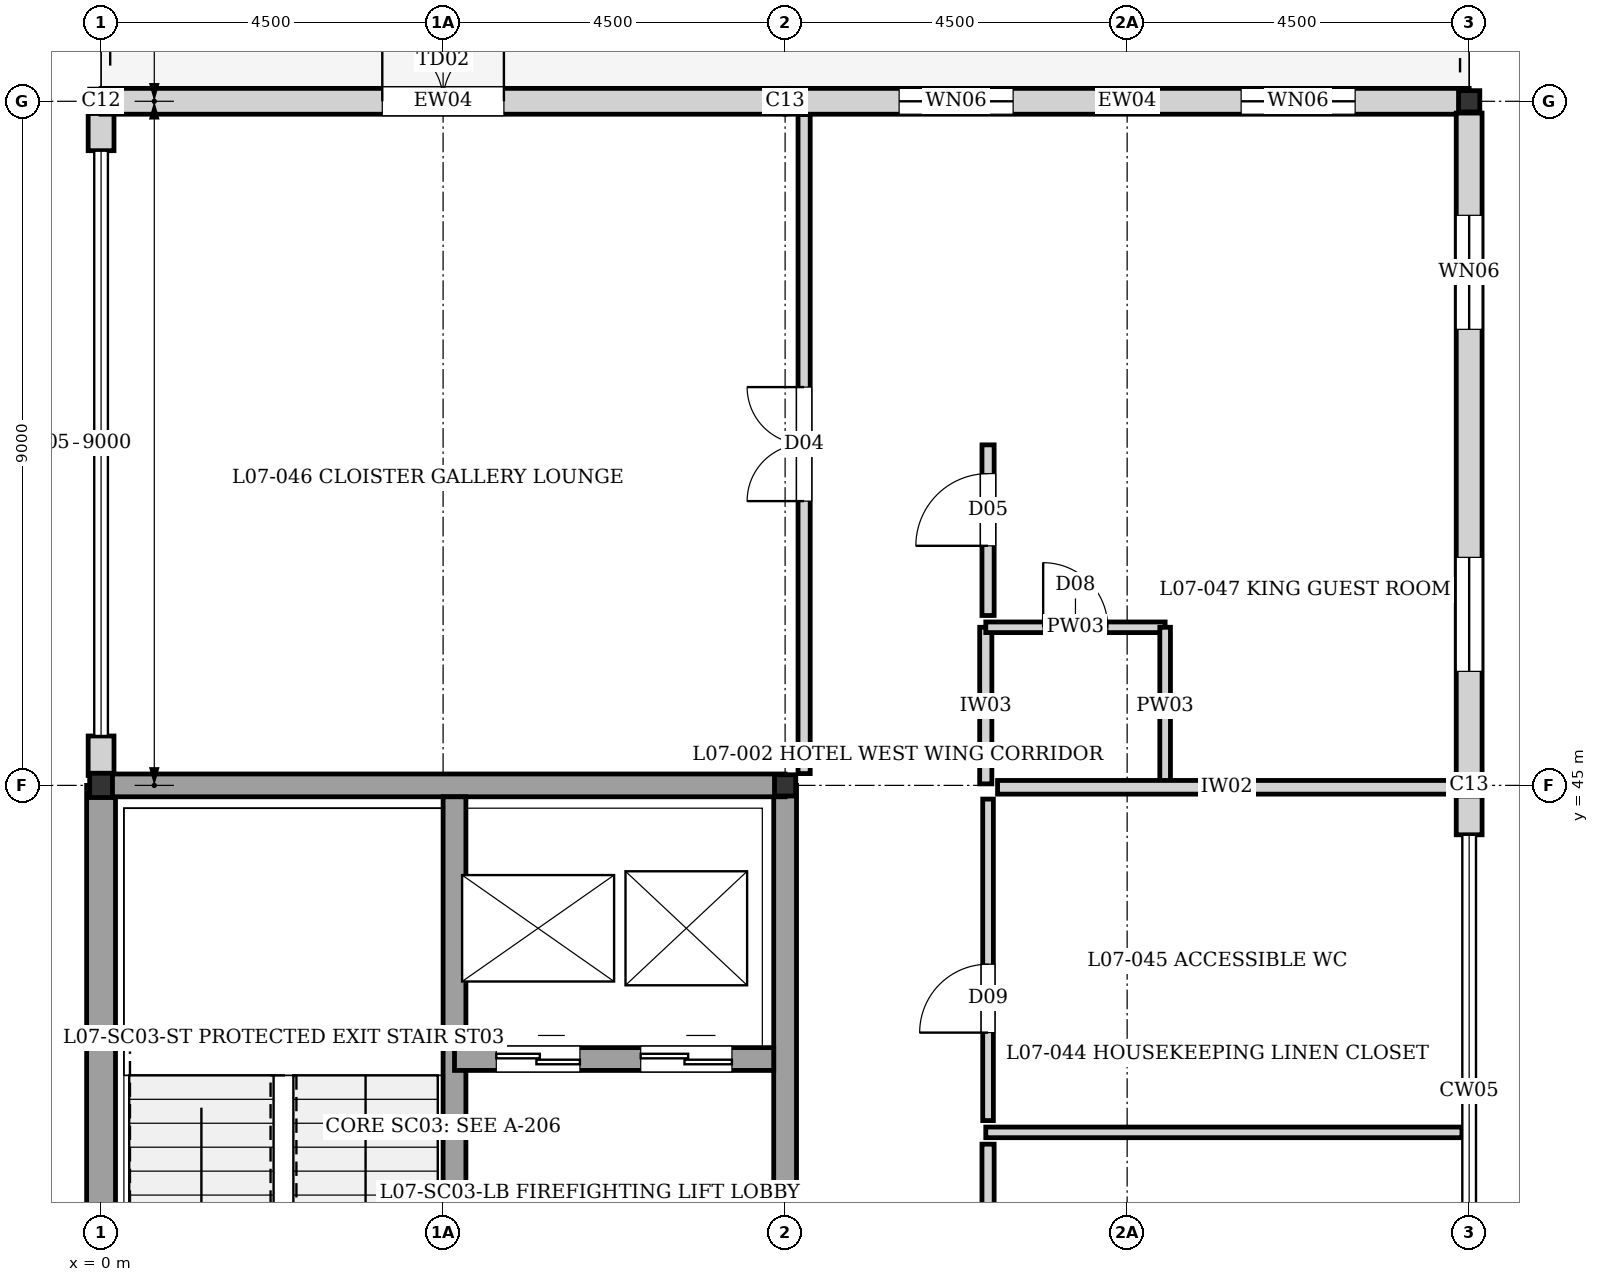
"""IFC4 building model, lengths in metres.
Left out: names, types, materials, properties, quantities, classifications, styles, units other than length and angle.
Written with IfcOpenShell. Run it as: python <this file> out.ifc"""

import sys

from ifc_helpers import new_model, si_unit, direction, frame, frame_2d, origin, origin_2d, place, context, subcontext, project, spatial, rectangle, i_section, extrude, element, fill, save


model = new_model("IFC4")
c1 = context("Model", 3, precision=1e-05, world=origin(), true_north=direction((0.0, 1.0)))
c2 = subcontext(c1, "Body", "Model", "MODEL_VIEW")
j1 = project(units=[si_unit("LENGTHUNIT", "METRE"), si_unit("PLANEANGLEUNIT", "RADIAN")], contexts=[c1])
p1 = place(None, origin())
s1 = spatial("IfcSite", under=j1, at=p1, CompositionType="ELEMENT")
p2 = place(p1, origin())
s2 = spatial("IfcBuilding", under=s1, at=p2, CompositionType="ELEMENT")
p3 = place(p2, frame((0.0, 0.0, 23.68)))
s3 = spatial("IfcBuildingStorey", under=s2, at=p3, CompositionType="ELEMENT", Elevation=23.68)
for number, where, z_axis, x_axis in (
    (1, (0.0, 45.0, 0.0), (0.0, 0.0, 1.0), (1.0, 0.0, 0.0)),
    (2, (0.0, 54.0, 0.0), (0.0, 0.0, 1.0), (1.0, 0.0, 0.0)),
):
    element("IfcColumn", number, at=place(p3, frame(where, z_axis=z_axis, x_axis=x_axis)), inside=s3, PredefinedType="COLUMN", context=c2, shape_type="SweptSolid", body=[
        extrude(i_section(OverallWidth=0.3, OverallDepth=0.32, WebThickness=0.011, FlangeThickness=0.021, at=origin_2d()), origin(), (0.0, 0.0, 1.0), 3.2),
    ])
for number, where, z_axis, x_axis in (
    (3, (9.0, 45.0, 0.0), (0.0, 0.0, 1.0), (1.0, 0.0, 0.0)),
    (4, (9.0, 54.0, 0.0), (0.0, 0.0, 1.0), (1.0, 0.0, 0.0)),
    (5, (18.0, 45.0, 0.0), (0.0, 0.0, 1.0), (1.0, 0.0, 0.0)),
    (6, (18.0, 54.0, 0.0), (0.0, 0.0, 1.0), (1.0, 0.0, 0.0)),
):
    element("IfcColumn", number, at=place(p3, frame(where, z_axis=z_axis, x_axis=x_axis)), inside=s3, PredefinedType="COLUMN", context=c2, shape_type="SweptSolid", body=[
        extrude(i_section(OverallWidth=0.28, OverallDepth=0.28, WebThickness=0.01, FlangeThickness=0.018, at=origin_2d()), origin(), (0.0, 0.0, 1.0), 3.2),
    ])
p4 = place(p3, frame((0.0, 36.0, 0.0), z_axis=(0.0, 0.0, 1.0), x_axis=(0.0, 1.0, 0.0)))
e7 = element("IfcWall", 7, at=p4, inside=s3, PredefinedType="SOLIDWALL", context=c2, shape_type="SweptSolid", body=[
    extrude(rectangle(XDim=9.0, YDim=0.38, at=frame_2d((4.5, 0.0))), origin(), (0.0, 0.0, 1.0), 2.96),
])
p5 = place(p3, frame((0.0, 45.13, 0.0), z_axis=(0.0, 0.0, 1.0), x_axis=(0.0, 1.0, 0.0)))
e8 = element("IfcWall", 8, at=p5, inside=s3, PredefinedType="SOLIDWALL", context=c2, shape_type="SweptSolid", body=[
    extrude(rectangle(XDim=0.52, YDim=0.34, at=frame_2d((0.26, 0.0))), origin(), (0.0, 0.0, 1.0), 2.56),
])
p6 = place(p3, frame((0.0, 53.35, 0.0), z_axis=(0.0, 0.0, 1.0), x_axis=(0.0, 1.0, 0.0)))
e9 = element("IfcWall", 9, at=p6, inside=s3, PredefinedType="SOLIDWALL", context=c2, shape_type="SweptSolid", body=[
    extrude(rectangle(XDim=0.495, YDim=0.34, at=frame_2d((0.248, 0.0))), origin(), (0.0, 0.0, 1.0), 2.96),
])
p7 = place(p3, frame((0.0, 54.0, 0.0), z_axis=(0.0, 0.0, 1.0), x_axis=(1.0, 0.0, 0.0)))
e10 = element("IfcWall", 10, at=p7, inside=s3, PredefinedType="SOLIDWALL", context=c2, shape_type="SweptSolid", body=[
    extrude(rectangle(XDim=9.0, YDim=0.34, at=frame_2d((4.5, 0.0))), origin(), (0.0, 0.0, 1.0), 2.46),
])
p8 = place(p7, frame((3.7, 0.0, 0.0)))
e11 = element("IfcOpeningElement", 11, at=p8, cuts=e10, PredefinedType="OPENING", context=c2, shape_type="SweptSolid", body=[
    extrude(rectangle(XDim=1.6, YDim=2.25, at=frame_2d((0.8, 1.125))), frame((0.0, 0.18, 0.0), z_axis=(0.0, -1.0, 0.0), x_axis=(1.0, 0.0, 0.0)), (0.0, 0.0, 1.0), 0.36),
])
p9 = place(p3, frame((9.0, 54.0, 0.0), z_axis=(0.0, 0.0, 1.0), x_axis=(1.0, 0.0, 0.0)))
e12 = element("IfcWall", 12, at=p9, inside=s3, PredefinedType="SOLIDWALL", context=c2, shape_type="SweptSolid", body=[
    extrude(rectangle(XDim=9.0, YDim=0.34, at=frame_2d((4.5, 0.0))), origin(), (0.0, 0.0, 1.0), 2.41),
])
p10 = place(p9, frame((1.5, 0.0, 0.35)))
e13 = element("IfcOpeningElement", 13, at=p10, cuts=e12, PredefinedType="OPENING", context=c2, shape_type="SweptSolid", body=[
    extrude(rectangle(XDim=1.5, YDim=1.8, at=frame_2d((0.75, 0.9))), frame((0.0, 0.18, 0.0), z_axis=(0.0, -1.0, 0.0), x_axis=(1.0, 0.0, 0.0)), (0.0, 0.0, 1.0), 0.36),
])
p11 = place(p9, frame((6.0, 0.0, 0.35)))
e14 = element("IfcOpeningElement", 14, at=p11, cuts=e12, PredefinedType="OPENING", context=c2, shape_type="SweptSolid", body=[
    extrude(rectangle(XDim=1.5, YDim=1.8, at=frame_2d((0.75, 0.9))), frame((0.0, 0.18, 0.0), z_axis=(0.0, -1.0, 0.0), x_axis=(1.0, 0.0, 0.0)), (0.0, 0.0, 1.0), 0.36),
])
p12 = place(p3, frame((18.0, 53.845, 0.0), z_axis=(0.0, 0.0, 1.0), x_axis=(0.0, -1.0, 0.0)))
e15 = element("IfcWall", 15, at=p12, inside=s3, PredefinedType="SOLIDWALL", context=c2, shape_type="SweptSolid", body=[
    extrude(rectangle(XDim=8.845, YDim=0.34, at=frame_2d((4.422, 0.0))), origin(), (0.0, 0.0, 1.0), 2.56),
])
p13 = place(p12, frame((1.345, 0.0, 0.35)))
e16 = element("IfcOpeningElement", 16, at=p13, cuts=e15, PredefinedType="OPENING", context=c2, shape_type="SweptSolid", body=[
    extrude(rectangle(XDim=1.5, YDim=1.8, at=frame_2d((0.75, 0.9))), frame((0.0, 0.18, 0.0), z_axis=(0.0, -1.0, 0.0), x_axis=(1.0, 0.0, 0.0)), (0.0, 0.0, 1.0), 0.36),
])
p14 = place(p12, frame((5.845, 0.0, 0.35)))
e17 = element("IfcOpeningElement", 17, at=p14, cuts=e15, PredefinedType="OPENING", context=c2, shape_type="SweptSolid", body=[
    extrude(rectangle(XDim=1.5, YDim=1.8, at=frame_2d((0.75, 0.9))), frame((0.0, 0.18, 0.0), z_axis=(0.0, -1.0, 0.0), x_axis=(1.0, 0.0, 0.0)), (0.0, 0.0, 1.0), 0.36),
])
p15 = place(p3, frame((18.0, 45.0, 0.0), z_axis=(0.0, 0.0, 1.0), x_axis=(0.0, -1.0, 0.0)))
e18 = element("IfcWall", 18, at=p15, inside=s3, PredefinedType="SOLIDWALL", context=c2, shape_type="SweptSolid", body=[
    extrude(rectangle(XDim=0.65, YDim=0.34, at=frame_2d((0.325, 0.0))), origin(), (0.0, 0.0, 1.0), 2.6),
])
p16 = place(p3, frame((9.0, 36.0, 0.0), z_axis=(0.0, 0.0, 1.0), x_axis=(0.0, 1.0, 0.0)))
e19 = element("IfcWall", 19, at=p16, inside=s3, PredefinedType="SHEAR", context=c2, shape_type="SweptSolid", body=[
    extrude(rectangle(XDim=9.0, YDim=0.3, at=frame_2d((4.5, 0.0))), origin(), (0.0, 0.0, 1.0), 2.96),
])
p17 = place(p16, frame((1.95, 0.0, 0.0)))
e20 = element("IfcOpeningElement", 20, at=p17, cuts=e19, PredefinedType="OPENING", context=c2, shape_type="SweptSolid", body=[
    extrude(rectangle(XDim=1.6, YDim=2.1, at=frame_2d((0.8, 1.05))), frame((0.0, 0.16, 0.0), z_axis=(0.0, -1.0, 0.0), x_axis=(1.0, 0.0, 0.0)), (0.0, 0.0, 1.0), 0.32),
])
p18 = place(p3, frame((0.0, 45.0, 0.0), z_axis=(0.0, 0.0, 1.0), x_axis=(1.0, 0.0, 0.0)))
e21 = element("IfcWall", 21, at=p18, inside=s3, PredefinedType="SHEAR", context=c2, shape_type="SweptSolid", body=[
    extrude(rectangle(XDim=9.0, YDim=0.3, at=frame_2d((4.5, 0.0))), origin(), (0.0, 0.0, 1.0), 2.96),
])
p19 = place(p3, frame((4.65, 36.15, 0.0), z_axis=(0.0, 0.0, 1.0), x_axis=(0.0, 1.0, 0.0)))
e22 = element("IfcWall", 22, at=p19, inside=s3, PredefinedType="SHEAR", context=c2, shape_type="SweptSolid", body=[
    extrude(rectangle(XDim=8.7, YDim=0.3, at=frame_2d((4.35, 0.0))), origin(), (0.0, 0.0, 1.0), 2.96),
])
p20 = place(p19, frame((0.35, 0.0, 0.0)))
e23 = element("IfcOpeningElement", 23, at=p20, cuts=e22, PredefinedType="OPENING", context=c2, shape_type="SweptSolid", body=[
    extrude(rectangle(XDim=1.4, YDim=2.02, at=frame_2d((0.7, 1.01))), frame((0.0, 0.16, 0.0), z_axis=(0.0, -1.0, 0.0), x_axis=(1.0, 0.0, 0.0)), (0.0, 0.0, 1.0), 0.32),
])
p21 = place(p3, frame((4.65, 41.4, 0.0), z_axis=(0.0, 0.0, 1.0), x_axis=(1.0, 0.0, 0.0)))
e24 = element("IfcWall", 24, at=p21, inside=s3, PredefinedType="SHEAR", context=c2, shape_type="SweptSolid", body=[
    extrude(rectangle(XDim=4.2, YDim=0.3, at=frame_2d((2.1, 0.0))), origin(), (0.0, 0.0, 1.0), 2.96),
])
p22 = place(p21, frame((0.55, 0.0, 0.0)))
e25 = element("IfcOpeningElement", 25, at=p22, cuts=e24, PredefinedType="OPENING", context=c2, shape_type="SweptSolid", body=[
    extrude(rectangle(XDim=1.1, YDim=2.1, at=frame_2d((0.55, 1.05))), frame((0.0, 0.16, 0.0), z_axis=(0.0, -1.0, 0.0), x_axis=(1.0, 0.0, 0.0)), (0.0, 0.0, 1.0), 0.32),
])
p23 = place(p21, frame((2.45, 0.0, 0.0)))
e26 = element("IfcOpeningElement", 26, at=p23, cuts=e24, PredefinedType="OPENING", context=c2, shape_type="SweptSolid", body=[
    extrude(rectangle(XDim=1.2, YDim=2.2, at=frame_2d((0.6, 1.1))), frame((0.0, 0.16, 0.0), z_axis=(0.0, -1.0, 0.0), x_axis=(1.0, 0.0, 0.0)), (0.0, 0.0, 1.0), 0.32),
])
p24 = place(p3, frame((11.64, 45.02, 0.0), z_axis=(0.0, 0.0, 1.0), x_axis=(0.0, 1.0, 0.0)))
e27 = element("IfcWall", 27, at=p24, inside=s3, PredefinedType="PARTITIONING", context=c2, shape_type="SweptSolid", body=[
    extrude(rectangle(XDim=2.06, YDim=0.16, at=frame_2d((1.03, 0.0))), origin(), (0.0, 0.0, 1.0), 2.96),
])
p25 = place(p3, frame((11.64, 47.08, 0.0), z_axis=(0.0, 0.0, 1.0), x_axis=(1.0, 0.0, 0.0)))
e28 = element("IfcWall", 28, at=p25, inside=s3, PredefinedType="PLUMBINGWALL", context=c2, shape_type="SweptSolid", body=[
    extrude(rectangle(XDim=2.36, YDim=0.14, at=frame_2d((1.18, 0.0))), origin(), (0.0, 0.0, 1.0), 2.96),
])
p26 = place(p25, frame((0.755, 0.0, 0.0)))
e29 = element("IfcOpeningElement", 29, at=p26, cuts=e28, PredefinedType="OPENING", context=c2, shape_type="SweptSolid", body=[
    extrude(rectangle(XDim=0.85, YDim=2.04, at=frame_2d((0.425, 1.02))), frame((0.0, 0.08, 0.0), z_axis=(0.0, -1.0, 0.0), x_axis=(1.0, 0.0, 0.0)), (0.0, 0.0, 1.0), 0.16),
])
p27 = place(p3, frame((14.0, 45.02, 0.0), z_axis=(0.0, 0.0, 1.0), x_axis=(0.0, 1.0, 0.0)))
e30 = element("IfcWall", 30, at=p27, inside=s3, PredefinedType="PLUMBINGWALL", context=c2, shape_type="SweptSolid", body=[
    extrude(rectangle(XDim=2.06, YDim=0.14, at=frame_2d((1.03, 0.0))), origin(), (0.0, 0.0, 1.0), 2.96),
])
p28 = place(p3, frame((11.795, 44.975, 0.0), z_axis=(0.0, 0.0, 1.0), x_axis=(1.0, 0.0, 0.0)))
e31 = element("IfcWall", 31, at=p28, inside=s3, PredefinedType="PARTITIONING", context=c2, shape_type="SweptSolid", body=[
    extrude(rectangle(XDim=6.03, YDim=0.18, at=frame_2d((3.015, 0.0))), origin(), (0.0, 0.0, 1.0), 2.6),
])
p29 = place(p3, frame((11.64, 40.435, 0.0), z_axis=(0.0, 0.0, 1.0), x_axis=(1.0, 0.0, 0.0)))
e32 = element("IfcWall", 32, at=p29, inside=s3, PredefinedType="PLUMBINGWALL", context=c2, shape_type="SweptSolid", body=[
    extrude(rectangle(XDim=6.265, YDim=0.14, at=frame_2d((3.133, 0.0))), origin(), (0.0, 0.0, 1.0), 2.96),
])
p30 = place(p3, frame((11.67, 36.155, 0.0), z_axis=(0.0, 0.0, 1.0), x_axis=(0.0, 1.0, 0.0)))
e33 = element("IfcWall", 33, at=p30, inside=s3, PredefinedType="PARTITIONING", context=c2, shape_type="SweptSolid", body=[
    extrude(rectangle(XDim=4.125, YDim=0.16, at=frame_2d((2.062, 0.0))), origin(), (0.0, 0.0, 1.0), 2.96),
])
p31 = place(p30, frame((2.058, 0.0, 0.0)))
e34 = element("IfcOpeningElement", 34, at=p31, cuts=e33, PredefinedType="OPENING", context=c2, shape_type="SweptSolid", body=[
    extrude(rectangle(XDim=1.0, YDim=2.1, at=frame_2d((0.5, 1.05))), frame((0.0, 0.09, 0.0), z_axis=(0.0, -1.0, 0.0), x_axis=(1.0, 0.0, 0.0)), (0.0, 0.0, 1.0), 0.18),
])
p32 = place(p3, frame((11.67, 40.59, 0.0), z_axis=(0.0, 0.0, 1.0), x_axis=(0.0, 1.0, 0.0)))
e35 = element("IfcWall", 35, at=p32, inside=s3, PredefinedType="PLUMBINGWALL", context=c2, shape_type="SweptSolid", body=[
    extrude(rectangle(XDim=4.23, YDim=0.14, at=frame_2d((2.115, 0.0))), origin(), (0.0, 0.0, 1.0), 2.96),
])
p33 = place(p32, frame((1.157, 0.0, 0.0)))
e36 = element("IfcOpeningElement", 36, at=p33, cuts=e35, PredefinedType="OPENING", context=c2, shape_type="SweptSolid", body=[
    extrude(rectangle(XDim=0.9, YDim=2.1, at=frame_2d((0.45, 1.05))), frame((0.0, 0.08, 0.0), z_axis=(0.0, -1.0, 0.0), x_axis=(1.0, 0.0, 0.0)), (0.0, 0.0, 1.0), 0.16),
])
p34 = place(p3, frame((9.25, 45.155, 0.0), z_axis=(0.0, 0.0, 1.0), x_axis=(0.0, 1.0, 0.0)))
e37 = element("IfcWall", 37, at=p34, inside=s3, PredefinedType="PARTITIONING", context=c2, shape_type="SweptSolid", body=[
    extrude(rectangle(XDim=8.67, YDim=0.16, at=frame_2d((4.335, 0.0))), origin(), (0.0, 0.0, 1.0), 2.96),
])
p35 = place(p34, frame((3.585, 0.0, 0.0)))
e38 = element("IfcOpeningElement", 38, at=p35, cuts=e37, PredefinedType="OPENING", context=c2, shape_type="SweptSolid", body=[
    extrude(rectangle(XDim=1.5, YDim=2.1, at=frame_2d((0.75, 1.05))), frame((0.0, 0.09, 0.0), z_axis=(0.0, -1.0, 0.0), x_axis=(1.0, 0.0, 0.0)), (0.0, 0.0, 1.0), 0.18),
])
p36 = place(p3, frame((11.67, 47.235, 0.0), z_axis=(0.0, 0.0, 1.0), x_axis=(0.0, 1.0, 0.0)))
e39 = element("IfcWall", 39, at=p36, inside=s3, PredefinedType="PARTITIONING", context=c2, shape_type="SweptSolid", body=[
    extrude(rectangle(XDim=2.245, YDim=0.16, at=frame_2d((1.123, 0.0))), origin(), (0.0, 0.0, 1.0), 2.96),
])
p37 = place(p36, frame((0.917, 0.0, 0.0)))
e40 = element("IfcOpeningElement", 40, at=p37, cuts=e39, PredefinedType="OPENING", context=c2, shape_type="SweptSolid", body=[
    extrude(rectangle(XDim=0.95, YDim=2.15, at=frame_2d((0.475, 1.075))), frame((0.0, 0.09, 0.0), z_axis=(0.0, -1.0, 0.0), x_axis=(1.0, 0.0, 0.0)), (0.0, 0.0, 1.0), 0.18),
])
p38 = place(p8, origin())
e41 = element("IfcDoor", 41, at=p38, inside=s3, OperationType="DOUBLE_DOOR_SINGLE_SWING", PredefinedType="DOOR", context=c2, shape_type="SweptSolid", body=[
    extrude(rectangle(XDim=1.6, YDim=2.25, at=frame_2d((0.8, 1.125))), frame((0.0, 0.025, 0.0), z_axis=(0.0, -1.0, 0.0), x_axis=(1.0, 0.0, 0.0)), (0.0, 0.0, 1.0), 0.05),
])
fill(e11, e41)
p39 = place(p10, origin())
e42 = element("IfcWindow", 42, at=p39, inside=s3, PartitioningType="SINGLE_PANEL", PredefinedType="WINDOW", context=c2, shape_type="SweptSolid", body=[
    extrude(rectangle(XDim=1.5, YDim=1.8, at=frame_2d((0.75, 0.9))), frame((0.0, 0.03, 0.0), z_axis=(0.0, -1.0, 0.0), x_axis=(1.0, 0.0, 0.0)), (0.0, 0.0, 1.0), 0.06),
])
fill(e13, e42)
p40 = place(p11, origin())
e43 = element("IfcWindow", 43, at=p40, inside=s3, PartitioningType="SINGLE_PANEL", PredefinedType="WINDOW", context=c2, shape_type="SweptSolid", body=[
    extrude(rectangle(XDim=1.5, YDim=1.8, at=frame_2d((0.75, 0.9))), frame((0.0, 0.03, 0.0), z_axis=(0.0, -1.0, 0.0), x_axis=(1.0, 0.0, 0.0)), (0.0, 0.0, 1.0), 0.06),
])
fill(e14, e43)
p41 = place(p13, origin())
e44 = element("IfcWindow", 44, at=p41, inside=s3, PartitioningType="SINGLE_PANEL", PredefinedType="WINDOW", context=c2, shape_type="SweptSolid", body=[
    extrude(rectangle(XDim=1.5, YDim=1.8, at=frame_2d((0.75, 0.9))), frame((0.0, 0.03, 0.0), z_axis=(0.0, -1.0, 0.0), x_axis=(1.0, 0.0, 0.0)), (0.0, 0.0, 1.0), 0.06),
])
fill(e16, e44)
p42 = place(p14, origin())
e45 = element("IfcWindow", 45, at=p42, inside=s3, PartitioningType="SINGLE_PANEL", PredefinedType="WINDOW", context=c2, shape_type="SweptSolid", body=[
    extrude(rectangle(XDim=1.5, YDim=1.8, at=frame_2d((0.75, 0.9))), frame((0.0, 0.03, 0.0), z_axis=(0.0, -1.0, 0.0), x_axis=(1.0, 0.0, 0.0)), (0.0, 0.0, 1.0), 0.06),
])
fill(e17, e45)
p43 = place(p17, origin())
e46 = element("IfcDoor", 46, at=p43, inside=s3, OperationType="DOUBLE_DOOR_SINGLE_SWING", PredefinedType="DOOR", context=c2, shape_type="SweptSolid", body=[
    extrude(rectangle(XDim=1.6, YDim=2.1, at=frame_2d((0.8, 1.05))), frame((0.0, 0.025, 0.0), z_axis=(0.0, -1.0, 0.0), x_axis=(1.0, 0.0, 0.0)), (0.0, 0.0, 1.0), 0.05),
])
fill(e20, e46)
p44 = place(p22, origin())
e47 = element("IfcDoor", 47, at=p44, inside=s3, OperationType="DOUBLE_DOOR_SLIDING", PredefinedType="DOOR", context=c2, shape_type="SweptSolid", body=[
    extrude(rectangle(XDim=1.1, YDim=2.1, at=frame_2d((0.55, 1.05))), frame((0.0, 0.025, 0.0), z_axis=(0.0, -1.0, 0.0), x_axis=(1.0, 0.0, 0.0)), (0.0, 0.0, 1.0), 0.05),
])
fill(e25, e47)
p45 = place(p23, origin())
e48 = element("IfcDoor", 48, at=p45, inside=s3, OperationType="DOUBLE_DOOR_SLIDING", PredefinedType="DOOR", context=c2, shape_type="SweptSolid", body=[
    extrude(rectangle(XDim=1.2, YDim=2.2, at=frame_2d((0.6, 1.1))), frame((0.0, 0.025, 0.0), z_axis=(0.0, -1.0, 0.0), x_axis=(1.0, 0.0, 0.0)), (0.0, 0.0, 1.0), 0.05),
])
fill(e26, e48)
p46 = place(p26, origin())
e49 = element("IfcDoor", 49, at=p46, inside=s3, OperationType="SINGLE_SWING_LEFT", PredefinedType="DOOR", context=c2, shape_type="SweptSolid", body=[
    extrude(rectangle(XDim=0.85, YDim=2.04, at=frame_2d((0.425, 1.02))), frame((0.0, 0.025, 0.0), z_axis=(0.0, -1.0, 0.0), x_axis=(1.0, 0.0, 0.0)), (0.0, 0.0, 1.0), 0.05),
])
fill(e29, e49)
p47 = place(p33, origin())
e50 = element("IfcDoor", 50, at=p47, inside=s3, OperationType="SINGLE_SWING_LEFT", PredefinedType="DOOR", context=c2, shape_type="SweptSolid", body=[
    extrude(rectangle(XDim=0.9, YDim=2.1, at=frame_2d((0.45, 1.05))), frame((0.0, 0.025, 0.0), z_axis=(0.0, -1.0, 0.0), x_axis=(1.0, 0.0, 0.0)), (0.0, 0.0, 1.0), 0.05),
])
fill(e36, e50)
p48 = place(p35, origin())
e51 = element("IfcDoor", 51, at=p48, inside=s3, OperationType="DOUBLE_DOOR_SINGLE_SWING", PredefinedType="DOOR", context=c2, shape_type="SweptSolid", body=[
    extrude(rectangle(XDim=1.5, YDim=2.1, at=frame_2d((0.75, 1.05))), frame((0.0, 0.025, 0.0), z_axis=(0.0, -1.0, 0.0), x_axis=(1.0, 0.0, 0.0)), (0.0, 0.0, 1.0), 0.05),
])
fill(e38, e51)
p49 = place(p37, origin())
e52 = element("IfcDoor", 52, at=p49, inside=s3, OperationType="SINGLE_SWING_LEFT", PredefinedType="DOOR", context=c2, shape_type="SweptSolid", body=[
    extrude(rectangle(XDim=0.95, YDim=2.15, at=frame_2d((0.475, 1.075))), frame((0.0, 0.025, 0.0), z_axis=(0.0, -1.0, 0.0), x_axis=(1.0, 0.0, 0.0)), (0.0, 0.0, 1.0), 0.05),
])
fill(e40, e52)
save(model, sys.argv[1])
